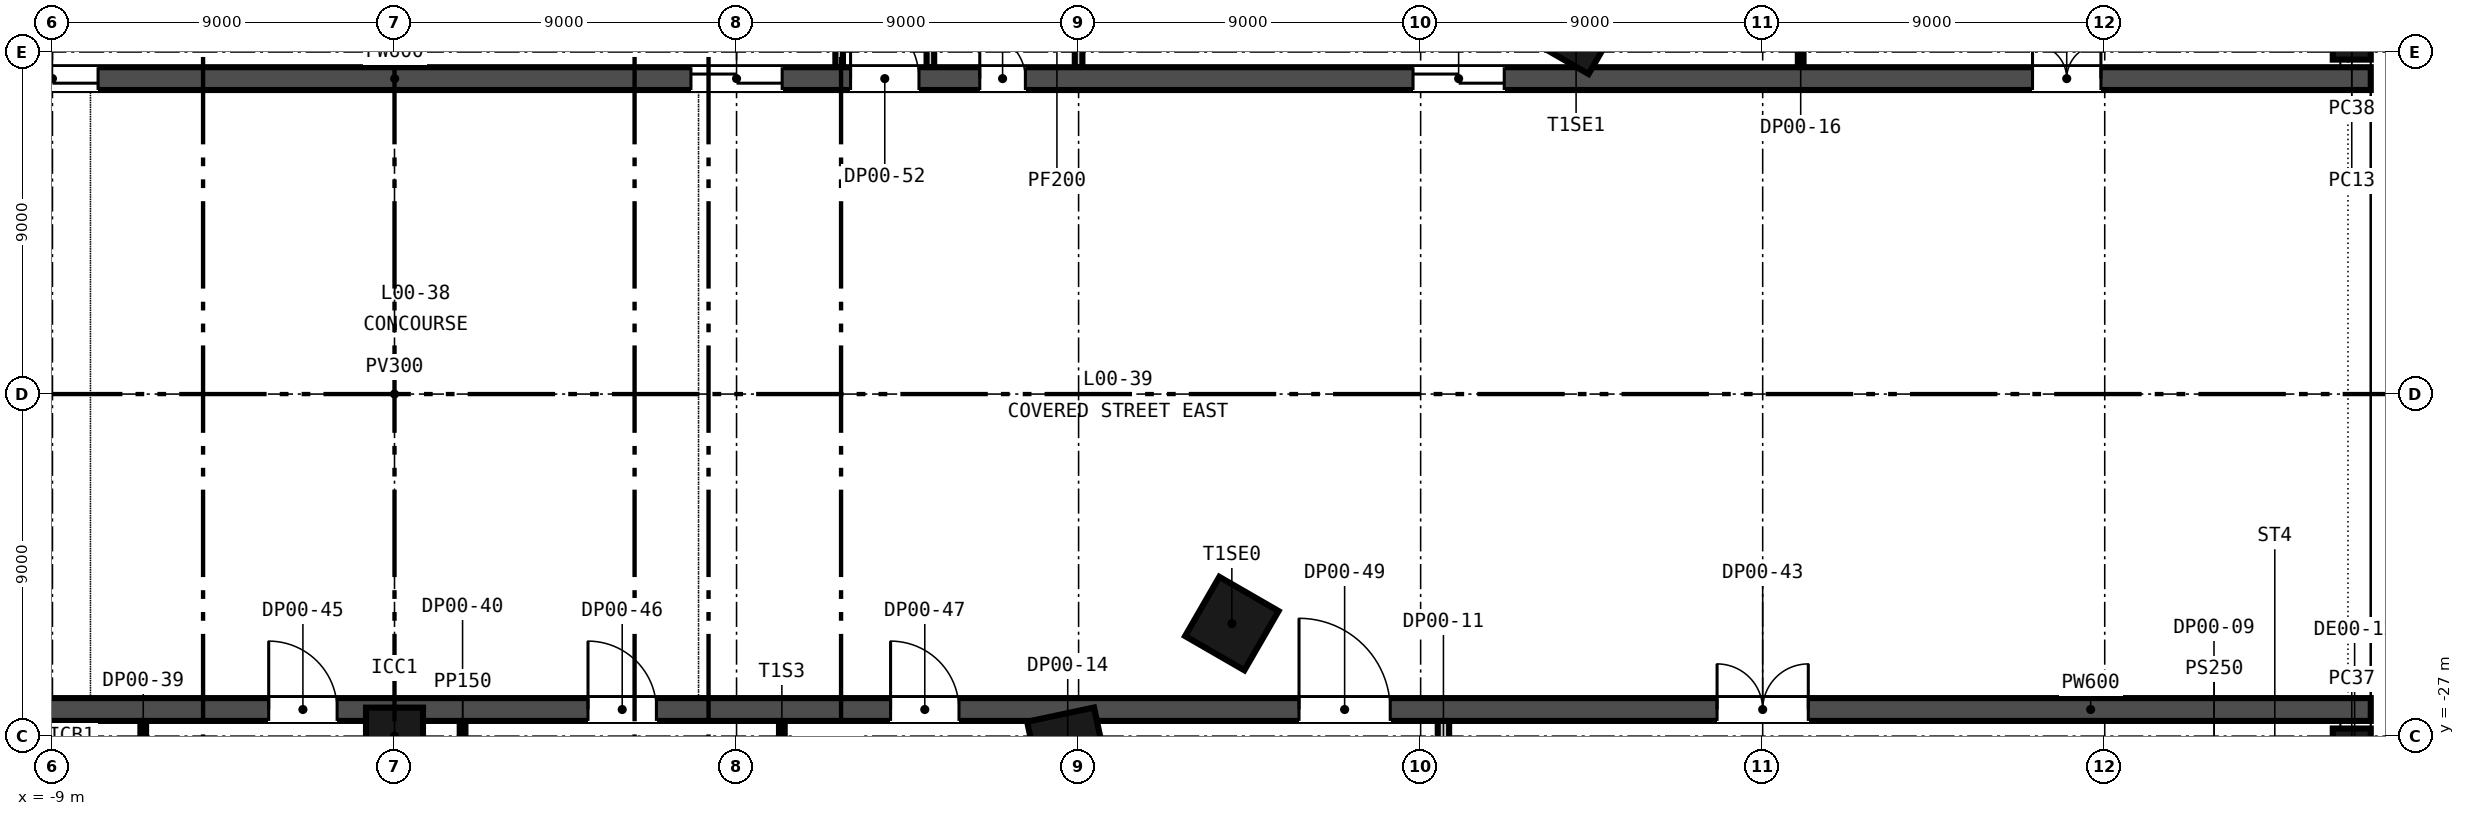
"""IFC4 building model, lengths in metres.
Left out: names, types, materials, properties, quantities, classifications, styles, units other than length and angle.
Written with IfcOpenShell. Run it as: python <this file> out.ifc"""

import sys

from ifc_helpers import new_model, si_unit, direction, frame, frame_2d, origin, origin_2d, place, context, subcontext, project, spatial, rectangle, extrude, element, fill, save


model = new_model("IFC4")
c1 = context("Model", 3, precision=1e-05, world=origin(), true_north=direction((0.0, 1.0)))
c2 = subcontext(c1, "Body", "Model", "MODEL_VIEW")
j1 = project(units=[si_unit("LENGTHUNIT", "METRE"), si_unit("PLANEANGLEUNIT", "RADIAN")], contexts=[c1])
p1 = place(None, origin())
s1 = spatial("IfcSite", under=j1, at=p1, CompositionType="ELEMENT")
p2 = place(p1, origin())
s2 = spatial("IfcBuilding", under=s1, at=p2, CompositionType="ELEMENT")
p3 = place(p2, origin())
s3 = spatial("IfcBuildingStorey", under=s2, at=p3, CompositionType="ELEMENT", Elevation=0.0)
for number, where, z_axis, x_axis in (
    (1, (17.714, -27.315, -0.3), (0.0, 0.0, 1.0), (0.978, 0.208, 0.0)),
    (2, (22.032, -24.039, -0.3), (0.0, 0.0, 1.0), (0.5, 0.866, 0.0)),
    (3, (31.09, -8.35, -0.3), (0.0, 0.0, 1.0), (0.5, 0.866, 0.0)),
):
    element("IfcColumn", number, at=place(p3, frame(where, z_axis=z_axis, x_axis=x_axis)), inside=s3, PredefinedType="COLUMN", context=c2, shape_type="SweptSolid", body=[
        extrude(rectangle(XDim=1.8, YDim=1.8, at=origin_2d()), origin(), (0.0, 0.0, 1.0), 8.9),
    ])
p4 = place(p3, frame((0.0, -27.0, -0.3), z_axis=(0.0, 0.0, 1.0), x_axis=(1.0, 0.0, 0.0)))
e4 = element("IfcColumn", 4, at=p4, inside=s3, PredefinedType="COLUMN", context=c2, shape_type="SweptSolid", body=[
    extrude(rectangle(XDim=1.5, YDim=1.5, at=origin_2d()), origin(), (0.0, 0.0, 1.0), 8.9),
])
for number, where, z_axis, x_axis in (
    (5, (51.5, -27.3, -0.3), (0.0, 0.0, 1.0), (0.0, 1.0, 0.0)),
    (6, (51.5, -8.7, -0.3), (0.0, 0.0, 1.0), (0.0, 1.0, 0.0)),
):
    element("IfcColumn", number, at=place(p3, frame(where, z_axis=z_axis, x_axis=x_axis)), inside=s3, PredefinedType="COLUMN", context=c2, shape_type="SweptSolid", body=[
        extrude(rectangle(XDim=1.0, YDim=1.0, at=origin_2d()), origin(), (0.0, 0.0, 1.0), 8.9),
    ])
p5 = place(p3, frame((-19.861, -26.3, -0.3), z_axis=(0.0, 0.0, 1.0), x_axis=(1.0, 0.0, 0.0)))
e7 = element("IfcWall", 7, at=p5, inside=s3, PredefinedType="SOLIDWALL", context=c2, shape_type="SweptSolid", body=[
    extrude(rectangle(XDim=71.861, YDim=0.6, at=frame_2d((35.93, 0.0))), origin(), (0.0, 0.0, 1.0), 8.9),
])
p6 = place(p5, frame((54.661, 0.0, 0.3)))
e8 = element("IfcOpeningElement", 8, at=p6, cuts=e7, PredefinedType="OPENING", context=c2, shape_type="SweptSolid", body=[
    extrude(rectangle(XDim=2.4, YDim=2.4, at=frame_2d((1.2, 1.2))), frame((0.0, 0.31, 0.0), z_axis=(0.0, -1.0, 0.0), x_axis=(1.0, 0.0, 0.0)), (0.0, 0.0, 1.0), 0.62),
])
p7 = place(p5, frame((8.589, 0.0, 0.3)))
e9 = element("IfcOpeningElement", 9, at=p7, cuts=e7, PredefinedType="OPENING", context=c2, shape_type="SweptSolid", body=[
    extrude(rectangle(XDim=1.8, YDim=2.4, at=frame_2d((0.9, 1.2))), frame((0.0, 0.31, 0.0), z_axis=(0.0, -1.0, 0.0), x_axis=(1.0, 0.0, 0.0)), (0.0, 0.0, 1.0), 0.62),
])
p8 = place(p5, frame((16.551, 0.0, 0.3)))
e10 = element("IfcOpeningElement", 10, at=p8, cuts=e7, PredefinedType="OPENING", context=c2, shape_type="SweptSolid", body=[
    extrude(rectangle(XDim=1.8, YDim=2.4, at=frame_2d((0.9, 1.2))), frame((0.0, 0.31, 0.0), z_axis=(0.0, -1.0, 0.0), x_axis=(1.0, 0.0, 0.0)), (0.0, 0.0, 1.0), 0.62),
])
p9 = place(p5, frame((24.952, 0.0, 0.3)))
e11 = element("IfcOpeningElement", 11, at=p9, cuts=e7, PredefinedType="OPENING", context=c2, shape_type="SweptSolid", body=[
    extrude(rectangle(XDim=1.8, YDim=2.4, at=frame_2d((0.9, 1.2))), frame((0.0, 0.31, 0.0), z_axis=(0.0, -1.0, 0.0), x_axis=(1.0, 0.0, 0.0)), (0.0, 0.0, 1.0), 0.62),
])
p10 = place(p5, frame((32.914, 0.0, 0.3)))
e12 = element("IfcOpeningElement", 12, at=p10, cuts=e7, PredefinedType="OPENING", context=c2, shape_type="SweptSolid", body=[
    extrude(rectangle(XDim=1.8, YDim=2.4, at=frame_2d((0.9, 1.2))), frame((0.0, 0.31, 0.0), z_axis=(0.0, -1.0, 0.0), x_axis=(1.0, 0.0, 0.0)), (0.0, 0.0, 1.0), 0.62),
])
p11 = place(p5, frame((43.661, 0.0, 0.3)))
e13 = element("IfcOpeningElement", 13, at=p11, cuts=e7, PredefinedType="OPENING", context=c2, shape_type="SweptSolid", body=[
    extrude(rectangle(XDim=2.4, YDim=2.4, at=frame_2d((1.2, 1.2))), frame((0.0, 0.31, 0.0), z_axis=(0.0, -1.0, 0.0), x_axis=(1.0, 0.0, 0.0)), (0.0, 0.0, 1.0), 0.62),
])
p12 = place(p3, frame((-52.0, -9.7, -0.3), z_axis=(0.0, 0.0, 1.0), x_axis=(1.0, 0.0, 0.0)))
e14 = element("IfcWall", 14, at=p12, inside=s3, PredefinedType="SOLIDWALL", context=c2, shape_type="SweptSolid", body=[
    extrude(rectangle(XDim=104.0, YDim=0.6, at=frame_2d((52.0, 0.0))), origin(), (0.0, 0.0, 1.0), 8.9),
])
p13 = place(p12, frame((67.4, 0.0, 0.3)))
e15 = element("IfcOpeningElement", 15, at=p13, cuts=e14, PredefinedType="OPENING", context=c2, shape_type="SweptSolid", body=[
    extrude(rectangle(XDim=1.2, YDim=2.1, at=frame_2d((0.6, 1.05))), frame((0.0, 0.31, 0.0), z_axis=(0.0, -1.0, 0.0), x_axis=(1.0, 0.0, 0.0)), (0.0, 0.0, 1.0), 0.62),
])
p14 = place(p12, frame((38.2, 0.0, 0.3)))
e16 = element("IfcOpeningElement", 16, at=p14, cuts=e14, PredefinedType="OPENING", context=c2, shape_type="SweptSolid", body=[
    extrude(rectangle(XDim=1.8, YDim=2.4, at=frame_2d((0.9, 1.2))), frame((0.0, 0.31, 0.0), z_axis=(0.0, -1.0, 0.0), x_axis=(1.0, 0.0, 0.0)), (0.0, 0.0, 1.0), 0.62),
])
p15 = place(p12, frame((64.0, 0.0, 0.3)))
e17 = element("IfcOpeningElement", 17, at=p15, cuts=e14, PredefinedType="OPENING", context=c2, shape_type="SweptSolid", body=[
    extrude(rectangle(XDim=1.8, YDim=2.4, at=frame_2d((0.9, 1.2))), frame((0.0, 0.31, 0.0), z_axis=(0.0, -1.0, 0.0), x_axis=(1.0, 0.0, 0.0)), (0.0, 0.0, 1.0), 0.62),
])
p16 = place(p12, frame((41.8, 0.0, 0.3)))
e18 = element("IfcOpeningElement", 18, at=p16, cuts=e14, PredefinedType="OPENING", context=c2, shape_type="SweptSolid", body=[
    extrude(rectangle(XDim=2.4, YDim=2.4, at=frame_2d((1.2, 1.2))), frame((0.0, 0.31, 0.0), z_axis=(0.0, -1.0, 0.0), x_axis=(1.0, 0.0, 0.0)), (0.0, 0.0, 1.0), 0.62),
])
p17 = place(p12, frame((59.8, 0.0, 0.3)))
e19 = element("IfcOpeningElement", 19, at=p17, cuts=e14, PredefinedType="OPENING", context=c2, shape_type="SweptSolid", body=[
    extrude(rectangle(XDim=2.4, YDim=2.4, at=frame_2d((1.2, 1.2))), frame((0.0, 0.31, 0.0), z_axis=(0.0, -1.0, 0.0), x_axis=(1.0, 0.0, 0.0)), (0.0, 0.0, 1.0), 0.62),
])
p18 = place(p12, frame((22.8, 0.0, 0.3)))
e20 = element("IfcOpeningElement", 20, at=p18, cuts=e14, PredefinedType="OPENING", context=c2, shape_type="SweptSolid", body=[
    extrude(rectangle(XDim=2.4, YDim=2.4, at=frame_2d((1.2, 1.2))), frame((0.0, 0.31, 0.0), z_axis=(0.0, -1.0, 0.0), x_axis=(1.0, 0.0, 0.0)), (0.0, 0.0, 1.0), 0.62),
])
p19 = place(p12, frame((78.8, 0.0, 0.3)))
e21 = element("IfcOpeningElement", 21, at=p19, cuts=e14, PredefinedType="OPENING", context=c2, shape_type="SweptSolid", body=[
    extrude(rectangle(XDim=2.4, YDim=2.4, at=frame_2d((1.2, 1.2))), frame((0.0, 0.31, 0.0), z_axis=(0.0, -1.0, 0.0), x_axis=(1.0, 0.0, 0.0)), (0.0, 0.0, 1.0), 0.62),
])
p20 = place(p12, frame((7.1, 0.0, 0.3)))
e22 = element("IfcOpeningElement", 22, at=p20, cuts=e14, PredefinedType="OPENING", context=c2, shape_type="SweptSolid", body=[
    extrude(rectangle(XDim=1.8, YDim=2.4, at=frame_2d((0.9, 1.2))), frame((0.0, 0.31, 0.0), z_axis=(0.0, -1.0, 0.0), x_axis=(1.0, 0.0, 0.0)), (0.0, 0.0, 1.0), 0.62),
])
p21 = place(p12, frame((95.1, 0.0, 0.3)))
e23 = element("IfcOpeningElement", 23, at=p21, cuts=e14, PredefinedType="OPENING", context=c2, shape_type="SweptSolid", body=[
    extrude(rectangle(XDim=1.8, YDim=2.4, at=frame_2d((0.9, 1.2))), frame((0.0, 0.31, 0.0), z_axis=(0.0, -1.0, 0.0), x_axis=(1.0, 0.0, 0.0)), (0.0, 0.0, 1.0), 0.62),
])
p22 = place(p3, frame((-6.611, -31.549, 0.0), z_axis=(0.0, 0.0, 1.0), x_axis=(0.0, 1.0, 0.0)))
e24 = element("IfcWall", 24, at=p22, inside=s3, PredefinedType="PARTITIONING", context=c2, shape_type="SweptSolid", body=[
    extrude(rectangle(XDim=4.949, YDim=0.15, at=frame_2d((2.475, 0.0))), origin(), (0.0, 0.0, 1.0), 8.6),
])
p23 = place(p22, frame((1.9, 0.0, 0.0)))
e25 = element("IfcOpeningElement", 25, at=p23, cuts=e24, PredefinedType="OPENING", context=c2, shape_type="SweptSolid", body=[
    extrude(rectangle(XDim=1.0, YDim=2.1, at=frame_2d((0.5, 1.05))), frame((0.0, 0.085, 0.0), z_axis=(0.0, -1.0, 0.0), x_axis=(1.0, 0.0, 0.0)), (0.0, 0.0, 1.0), 0.17),
])
p24 = place(p3, frame((1.791, -29.763, 0.0), z_axis=(0.0, 0.0, 1.0), x_axis=(0.0, 1.0, 0.0)))
e26 = element("IfcWall", 26, at=p24, inside=s3, PredefinedType="PARTITIONING", context=c2, shape_type="SweptSolid", body=[
    extrude(rectangle(XDim=3.163, YDim=0.15, at=frame_2d((1.582, 0.0))), origin(), (0.0, 0.0, 1.0), 8.6),
])
p25 = place(p3, frame((10.192, -27.978, 0.0), z_axis=(0.0, 0.0, 1.0), x_axis=(0.0, 1.0, 0.0)))
e27 = element("IfcWall", 27, at=p25, inside=s3, PredefinedType="PARTITIONING", context=c2, shape_type="SweptSolid", body=[
    extrude(rectangle(XDim=1.377, YDim=0.15, at=frame_2d((0.689, 0.0))), origin(), (0.0, 0.0, 1.0), 8.6),
])
for number, where, z_axis, x_axis in (
    (28, (11.7, -9.4, 0.0), (0.0, 0.0, 1.0), (0.0, 1.0, 0.0)),
    (29, (14.1, -9.4, 0.0), (0.0, 0.0, 1.0), (0.0, 1.0, 0.0)),
    (30, (18.0, -9.4, 0.0), (0.0, 0.0, 1.0), (0.0, 1.0, 0.0)),
):
    element("IfcWall", number, at=place(p3, frame(where, z_axis=z_axis, x_axis=x_axis)), inside=s3, PredefinedType="PARTITIONING", context=c2, shape_type="SweptSolid", body=[
        extrude(rectangle(XDim=9.4, YDim=0.2, at=frame_2d((4.7, 0.0))), origin(), (0.0, 0.0, 1.0), 8.6),
    ])
p26 = place(p3, frame((27.6, -40.0, 0.0), z_axis=(0.0, 0.0, 1.0), x_axis=(0.0, 1.0, 0.0)))
e31 = element("IfcWall", 31, at=p26, inside=s3, PredefinedType="PARTITIONING", context=c2, shape_type="SweptSolid", body=[
    extrude(rectangle(XDim=13.4, YDim=0.3, at=frame_2d((6.7, 0.0))), origin(), (0.0, 0.0, 1.0), 8.6),
])
p27 = place(p26, frame((5.9, 0.0, 0.0)))
e32 = element("IfcOpeningElement", 32, at=p27, cuts=e31, PredefinedType="OPENING", context=c2, shape_type="SweptSolid", body=[
    extrude(rectangle(XDim=1.8, YDim=2.4, at=frame_2d((0.9, 1.2))), frame((0.0, 0.16, 0.0), z_axis=(0.0, -1.0, 0.0), x_axis=(1.0, 0.0, 0.0)), (0.0, 0.0, 1.0), 0.32),
])
p28 = place(p3, frame((37.0, -9.4, 0.0), z_axis=(0.0, 0.0, 1.0), x_axis=(0.0, 1.0, 0.0)))
e33 = element("IfcWall", 33, at=p28, inside=s3, PredefinedType="PARTITIONING", context=c2, shape_type="SweptSolid", body=[
    extrude(rectangle(XDim=1.0, YDim=0.15, at=frame_2d((0.5, 0.0))), origin(), (0.0, 0.0, 1.0), 8.0),
])
p29 = place(p6, origin())
e34 = element("IfcDoor", 34, at=p29, inside=s3, OperationType="SINGLE_SWING_LEFT", PredefinedType="DOOR", context=c2, shape_type="SweptSolid", body=[
    extrude(rectangle(XDim=2.4, YDim=2.4, at=frame_2d((1.2, 1.2))), frame((0.0, 0.025, 0.0), z_axis=(0.0, -1.0, 0.0), x_axis=(1.0, 0.0, 0.0)), (0.0, 0.0, 1.0), 0.05),
])
fill(e8, e34)
p30 = place(p8, origin())
e35 = element("IfcDoor", 35, at=p30, inside=s3, OperationType="SINGLE_SWING_LEFT", PredefinedType="DOOR", context=c2, shape_type="SweptSolid", body=[
    extrude(rectangle(XDim=1.8, YDim=2.4, at=frame_2d((0.9, 1.2))), frame((0.0, 0.025, 0.0), z_axis=(0.0, -1.0, 0.0), x_axis=(1.0, 0.0, 0.0)), (0.0, 0.0, 1.0), 0.05),
])
fill(e10, e35)
p31 = place(p9, origin())
e36 = element("IfcDoor", 36, at=p31, inside=s3, OperationType="SINGLE_SWING_LEFT", PredefinedType="DOOR", context=c2, shape_type="SweptSolid", body=[
    extrude(rectangle(XDim=1.8, YDim=2.4, at=frame_2d((0.9, 1.2))), frame((0.0, 0.025, 0.0), z_axis=(0.0, -1.0, 0.0), x_axis=(1.0, 0.0, 0.0)), (0.0, 0.0, 1.0), 0.05),
])
fill(e11, e36)
p32 = place(p10, origin())
e37 = element("IfcDoor", 37, at=p32, inside=s3, OperationType="SINGLE_SWING_LEFT", PredefinedType="DOOR", context=c2, shape_type="SweptSolid", body=[
    extrude(rectangle(XDim=1.8, YDim=2.4, at=frame_2d((0.9, 1.2))), frame((0.0, 0.025, 0.0), z_axis=(0.0, -1.0, 0.0), x_axis=(1.0, 0.0, 0.0)), (0.0, 0.0, 1.0), 0.05),
])
fill(e12, e37)
p33 = place(p11, origin())
e38 = element("IfcDoor", 38, at=p33, inside=s3, OperationType="SINGLE_SWING_LEFT", PredefinedType="DOOR", context=c2, shape_type="SweptSolid", body=[
    extrude(rectangle(XDim=2.4, YDim=2.4, at=frame_2d((1.2, 1.2))), frame((0.0, 0.025, 0.0), z_axis=(0.0, -1.0, 0.0), x_axis=(1.0, 0.0, 0.0)), (0.0, 0.0, 1.0), 0.05),
])
fill(e13, e38)
p34 = place(p13, frame((1.2, 0.0, 0.0), z_axis=(0.0, 0.0, 1.0), x_axis=(-1.0, 0.0, 0.0)))
e39 = element("IfcDoor", 39, at=p34, inside=s3, OperationType="SINGLE_SWING_LEFT", PredefinedType="DOOR", context=c2, shape_type="SweptSolid", body=[
    extrude(rectangle(XDim=1.2, YDim=2.1, at=frame_2d((0.6, 1.05))), frame((0.0, 0.025, 0.0), z_axis=(0.0, -1.0, 0.0), x_axis=(1.0, 0.0, 0.0)), (0.0, 0.0, 1.0), 0.05),
])
fill(e15, e39)
p35 = place(p15, frame((1.8, 0.0, 0.0), z_axis=(0.0, 0.0, 1.0), x_axis=(-1.0, 0.0, 0.0)))
e40 = element("IfcDoor", 40, at=p35, inside=s3, OperationType="SINGLE_SWING_LEFT", PredefinedType="DOOR", context=c2, shape_type="SweptSolid", body=[
    extrude(rectangle(XDim=1.8, YDim=2.4, at=frame_2d((0.9, 1.2))), frame((0.0, 0.025, 0.0), z_axis=(0.0, -1.0, 0.0), x_axis=(1.0, 0.0, 0.0)), (0.0, 0.0, 1.0), 0.05),
])
fill(e17, e40)
p36 = place(p16, frame((2.4, 0.0, 0.0), z_axis=(0.0, 0.0, 1.0), x_axis=(-1.0, 0.0, 0.0)))
e41 = element("IfcDoor", 41, at=p36, inside=s3, OperationType="SINGLE_SWING_LEFT", PredefinedType="DOOR", context=c2, shape_type="SweptSolid", body=[
    extrude(rectangle(XDim=2.4, YDim=2.4, at=frame_2d((1.2, 1.2))), frame((0.0, 0.025, 0.0), z_axis=(0.0, -1.0, 0.0), x_axis=(1.0, 0.0, 0.0)), (0.0, 0.0, 1.0), 0.05),
])
fill(e18, e41)
p37 = place(p17, frame((2.4, 0.0, 0.0), z_axis=(0.0, 0.0, 1.0), x_axis=(-1.0, 0.0, 0.0)))
e42 = element("IfcDoor", 42, at=p37, inside=s3, OperationType="SINGLE_SWING_LEFT", PredefinedType="DOOR", context=c2, shape_type="SweptSolid", body=[
    extrude(rectangle(XDim=2.4, YDim=2.4, at=frame_2d((1.2, 1.2))), frame((0.0, 0.025, 0.0), z_axis=(0.0, -1.0, 0.0), x_axis=(1.0, 0.0, 0.0)), (0.0, 0.0, 1.0), 0.05),
])
fill(e19, e42)
p38 = place(p19, frame((2.4, 0.0, 0.0), z_axis=(0.0, 0.0, 1.0), x_axis=(-1.0, 0.0, 0.0)))
e43 = element("IfcDoor", 43, at=p38, inside=s3, OperationType="SINGLE_SWING_LEFT", PredefinedType="DOOR", context=c2, shape_type="SweptSolid", body=[
    extrude(rectangle(XDim=2.4, YDim=2.4, at=frame_2d((1.2, 1.2))), frame((0.0, 0.025, 0.0), z_axis=(0.0, -1.0, 0.0), x_axis=(1.0, 0.0, 0.0)), (0.0, 0.0, 1.0), 0.05),
])
fill(e21, e43)
p39 = place(p21, frame((1.8, 0.0, 0.0), z_axis=(0.0, 0.0, 1.0), x_axis=(-1.0, 0.0, 0.0)))
e44 = element("IfcDoor", 44, at=p39, inside=s3, OperationType="SINGLE_SWING_LEFT", PredefinedType="DOOR", context=c2, shape_type="SweptSolid", body=[
    extrude(rectangle(XDim=1.8, YDim=2.4, at=frame_2d((0.9, 1.2))), frame((0.0, 0.025, 0.0), z_axis=(0.0, -1.0, 0.0), x_axis=(1.0, 0.0, 0.0)), (0.0, 0.0, 1.0), 0.05),
])
fill(e23, e44)
save(model, sys.argv[1])
